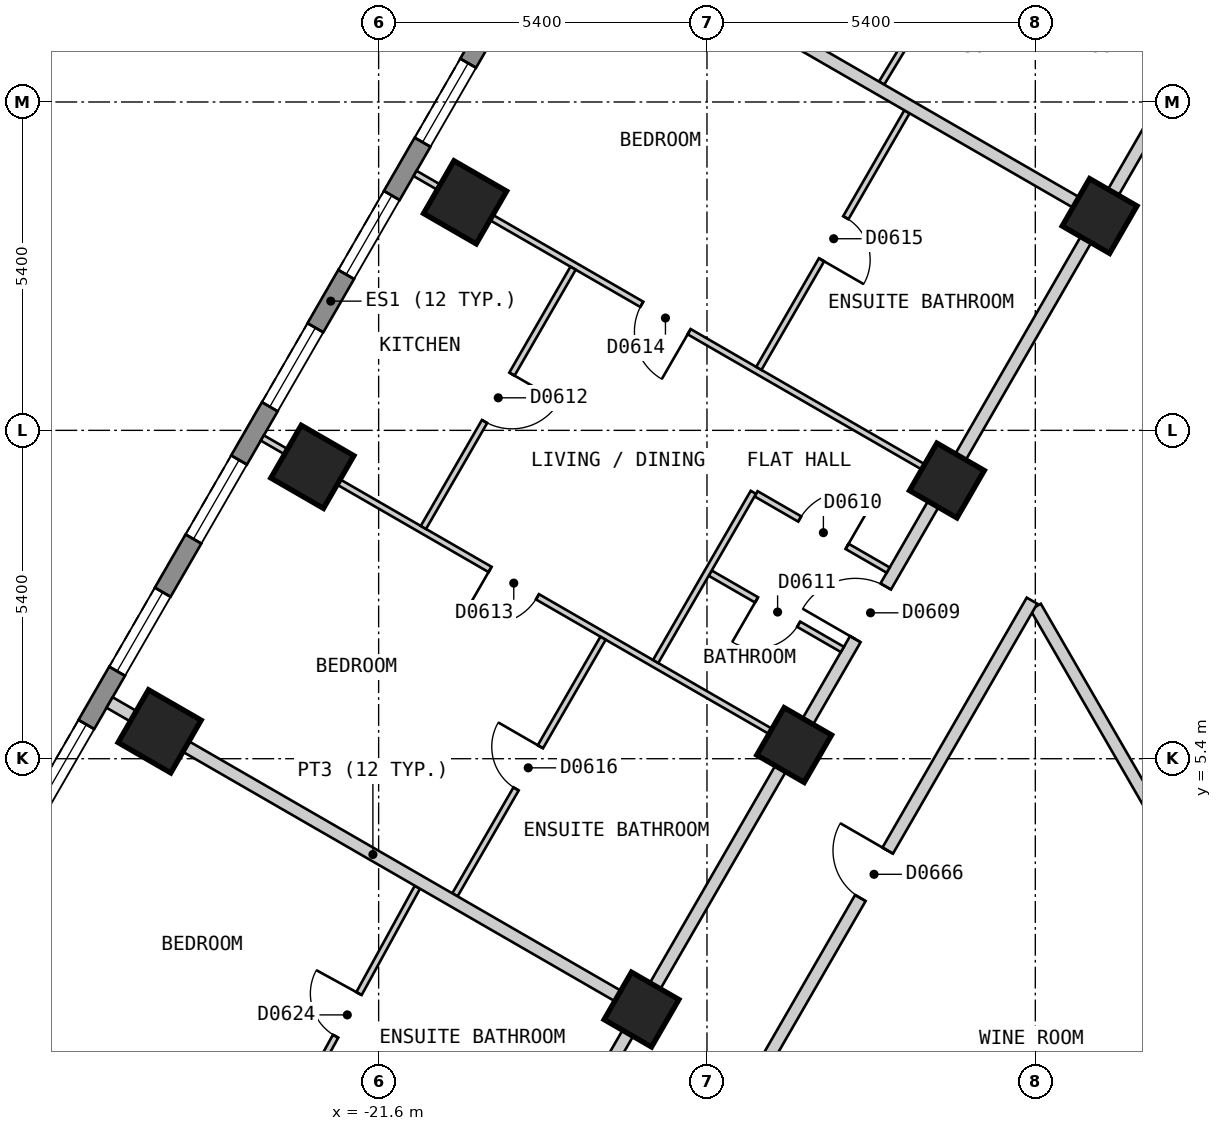
"""IFC4 building model, lengths in metres.
Left out: names, types, materials, properties, quantities, classifications, styles, units other than length and angle.
Written with IfcOpenShell. Run it as: python <this file> out.ifc"""

import sys

from ifc_helpers import new_model, si_unit, direction, frame, frame_2d, origin, origin_2d, place, context, subcontext, project, spatial, polyline, rectangle, outline, extrude, element, fill, save


model = new_model("IFC4")
c1 = context("Model", 3, precision=1e-05, world=origin(), true_north=direction((0.0, 1.0)))
c2 = subcontext(c1, "Body", "Model", "MODEL_VIEW")
j1 = project(units=[si_unit("LENGTHUNIT", "METRE"), si_unit("PLANEANGLEUNIT", "RADIAN")], contexts=[c1])
p1 = place(None, origin())
s1 = spatial("IfcSite", under=j1, at=p1, CompositionType="ELEMENT")
p2 = place(p1, origin())
s2 = spatial("IfcBuilding", under=s1, at=p2, CompositionType="ELEMENT")
p3 = place(p2, frame((0.0, 0.0, 75.0)))
s3 = spatial("IfcBuildingStorey", under=s2, at=p3, CompositionType="ELEMENT", Elevation=75.0)
for number, where, z_axis, x_axis in (
    (1, (-20.178, 14.55, 0.0), (0.0, 0.0, 1.0), (-0.5, -0.866, 0.0)),
    (2, (-22.69, 10.2, 0.0), (0.0, 0.0, 1.0), (-0.5, -0.866, 0.0)),
    (3, (-25.202, 5.85, 0.0), (0.0, 0.0, 1.0), (-0.5, -0.866, 0.0)),
):
    element("IfcColumn", number, at=place(p3, frame(where, z_axis=z_axis, x_axis=x_axis)), inside=s3, PredefinedType="COLUMN", context=c2, shape_type="SweptSolid", body=[
        extrude(rectangle(XDim=1.0, YDim=1.0, at=origin_2d()), origin(), (0.0, 0.0, 1.0), 3.0),
    ])
for number, where, z_axis, x_axis in (
    (4, (-9.743, 14.325, 0.0), (0.0, 0.0, 1.0), (-0.5, -0.866, 0.0)),
    (5, (-12.254, 9.975, 0.0), (0.0, 0.0, 1.0), (-0.5, -0.866, 0.0)),
    (6, (-14.766, 5.625, 0.0), (0.0, 0.0, 1.0), (-0.5, -0.866, 0.0)),
    (7, (-17.277, 1.275, 0.0), (0.0, 0.0, 1.0), (-0.5, -0.866, 0.0)),
):
    element("IfcColumn", number, at=place(p3, frame(where, z_axis=z_axis, x_axis=x_axis)), inside=s3, PredefinedType="COLUMN", context=c2, shape_type="SweptSolid", body=[
        extrude(rectangle(XDim=0.9, YDim=0.9, at=origin_2d()), origin(), (0.0, 0.0, 1.0), 3.0),
    ])
p4 = place(p3, frame((-15.747, 24.425, 0.0), z_axis=(0.0, 0.0, 1.0), x_axis=(-0.500027479704, -0.866009537788, 0.0)))
e8 = element("IfcWall", 8, at=p4, inside=s3, PredefinedType="SOLIDWALL", context=c2, shape_type="SweptSolid", body=[
    extrude(outline(polyline([(0.0, -0.15), (26.559, -0.15), (26.478, 0.15), (0.08, 0.15), (0.0, -0.15)])), origin(), (0.0, 0.0, 1.0), 2.7),
])
p5 = place(p4, frame((1.227, 0.0, 0.15)))
e9 = element("IfcOpeningElement", 9, at=p5, cuts=e8, PredefinedType="OPENING", context=c2, shape_type="SweptSolid", body=[
    extrude(rectangle(XDim=1.5, YDim=2.1, at=frame_2d((0.75, 1.05))), frame((0.0, 0.16, 0.0), z_axis=(0.0, -1.0, 0.0), x_axis=(1.0, 0.0, 0.0)), (0.0, 0.0, 1.0), 0.32),
])
p6 = place(p4, frame((3.739, 0.0, 0.15)))
e10 = element("IfcOpeningElement", 10, at=p6, cuts=e8, PredefinedType="OPENING", context=c2, shape_type="SweptSolid", body=[
    extrude(rectangle(XDim=1.5, YDim=2.1, at=frame_2d((0.75, 1.05))), frame((0.0, 0.16, 0.0), z_axis=(0.0, -1.0, 0.0), x_axis=(1.0, 0.0, 0.0)), (0.0, 0.0, 1.0), 0.32),
])
p7 = place(p4, frame((6.25, 0.0, 0.15)))
e11 = element("IfcOpeningElement", 11, at=p7, cuts=e8, PredefinedType="OPENING", context=c2, shape_type="SweptSolid", body=[
    extrude(rectangle(XDim=1.5, YDim=2.1, at=frame_2d((0.75, 1.05))), frame((0.0, 0.16, 0.0), z_axis=(0.0, -1.0, 0.0), x_axis=(1.0, 0.0, 0.0)), (0.0, 0.0, 1.0), 0.32),
])
p8 = place(p4, frame((8.761, 0.0, 0.15)))
e12 = element("IfcOpeningElement", 12, at=p8, cuts=e8, PredefinedType="OPENING", context=c2, shape_type="SweptSolid", body=[
    extrude(rectangle(XDim=1.5, YDim=2.1, at=frame_2d((0.75, 1.05))), frame((0.0, 0.16, 0.0), z_axis=(0.0, -1.0, 0.0), x_axis=(1.0, 0.0, 0.0)), (0.0, 0.0, 1.0), 0.32),
])
p9 = place(p4, frame((11.273, 0.0, 0.15)))
e13 = element("IfcOpeningElement", 13, at=p9, cuts=e8, PredefinedType="OPENING", context=c2, shape_type="SweptSolid", body=[
    extrude(rectangle(XDim=1.5, YDim=2.1, at=frame_2d((0.75, 1.05))), frame((0.0, 0.16, 0.0), z_axis=(0.0, -1.0, 0.0), x_axis=(1.0, 0.0, 0.0)), (0.0, 0.0, 1.0), 0.32),
])
p10 = place(p4, frame((13.785, 0.0, 0.15)))
e14 = element("IfcOpeningElement", 14, at=p10, cuts=e8, PredefinedType="OPENING", context=c2, shape_type="SweptSolid", body=[
    extrude(rectangle(XDim=1.5, YDim=2.1, at=frame_2d((0.75, 1.05))), frame((0.0, 0.16, 0.0), z_axis=(0.0, -1.0, 0.0), x_axis=(1.0, 0.0, 0.0)), (0.0, 0.0, 1.0), 0.32),
])
p11 = place(p4, frame((16.296, 0.0, 0.15)))
e15 = element("IfcOpeningElement", 15, at=p11, cuts=e8, PredefinedType="OPENING", context=c2, shape_type="SweptSolid", body=[
    extrude(rectangle(XDim=1.5, YDim=2.1, at=frame_2d((0.75, 1.05))), frame((0.0, 0.16, 0.0), z_axis=(0.0, -1.0, 0.0), x_axis=(1.0, 0.0, 0.0)), (0.0, 0.0, 1.0), 0.32),
])
p12 = place(p4, frame((18.807, 0.0, 0.15)))
e16 = element("IfcOpeningElement", 16, at=p12, cuts=e8, PredefinedType="OPENING", context=c2, shape_type="SweptSolid", body=[
    extrude(rectangle(XDim=1.5, YDim=2.1, at=frame_2d((0.75, 1.05))), frame((0.0, 0.16, 0.0), z_axis=(0.0, -1.0, 0.0), x_axis=(1.0, 0.0, 0.0)), (0.0, 0.0, 1.0), 0.32),
])
p13 = place(p4, frame((21.319, 0.0, 0.15)))
e17 = element("IfcOpeningElement", 17, at=p13, cuts=e8, PredefinedType="OPENING", context=c2, shape_type="SweptSolid", body=[
    extrude(rectangle(XDim=1.5, YDim=2.1, at=frame_2d((0.75, 1.05))), frame((0.0, 0.16, 0.0), z_axis=(0.0, -1.0, 0.0), x_axis=(1.0, 0.0, 0.0)), (0.0, 0.0, 1.0), 0.32),
])
p14 = place(p4, frame((23.831, 0.0, 0.15)))
e18 = element("IfcOpeningElement", 18, at=p14, cuts=e8, PredefinedType="OPENING", context=c2, shape_type="SweptSolid", body=[
    extrude(rectangle(XDim=1.5, YDim=2.1, at=frame_2d((0.75, 1.05))), frame((0.0, 0.16, 0.0), z_axis=(0.0, -1.0, 0.0), x_axis=(1.0, 0.0, 0.0)), (0.0, 0.0, 1.0), 0.32),
])
p15 = place(p3, frame((-10.796, 7.899, 0.0), z_axis=(0.0, 0.0, 1.0), x_axis=(0.500010383074, -0.866019409031, 0.0)))
e19 = element("IfcWall", 19, at=p15, inside=s3, PredefinedType="PARTITIONING", context=c2, shape_type="SweptSolid", body=[
    extrude(rectangle(XDim=7.535, YDim=0.2, at=frame_2d((3.768, 0.0))), origin(), (0.0, 0.0, 1.0), 2.7),
])
p16 = place(p3, frame((-16.05, -1.0, 0.0), z_axis=(0.0, 0.0, 1.0), x_axis=(0.499962449088, 0.866047082728, 0.0)))
e20 = element("IfcWall", 20, at=p16, inside=s3, PredefinedType="PARTITIONING", context=c2, shape_type="SweptSolid", body=[
    extrude(rectangle(XDim=10.391, YDim=0.2, at=frame_2d((5.195, 0.0))), origin(), (0.0, 0.0, 1.0), 2.7),
])
p17 = place(p16, frame((4.745, 0.0, 0.0)))
e21 = element("IfcOpeningElement", 21, at=p17, cuts=e20, PredefinedType="OPENING", context=c2, shape_type="SweptSolid", body=[
    extrude(rectangle(XDim=0.9, YDim=2.1, at=frame_2d((0.45, 1.05))), frame((0.0, 0.11, 0.0), z_axis=(0.0, -1.0, 0.0), x_axis=(1.0, 0.0, 0.0)), (0.0, 0.0, 1.0), 0.22),
])
p18 = place(p3, frame((-18.562, -0.951, 0.0), z_axis=(0.0, 0.0, 1.0), x_axis=(0.499992962407, 0.866029466902, 0.0)))
e22 = element("IfcWall", 22, at=p18, inside=s3, PredefinedType="PARTITIONING", context=c2, shape_type="SweptSolid", body=[
    extrude(rectangle(XDim=20.208, YDim=0.2, at=frame_2d((10.104, 0.0))), origin(), (0.0, 0.0, 1.0), 2.7),
])
p19 = place(p18, frame((9.604, 0.0, 0.0)))
e23 = element("IfcOpeningElement", 23, at=p19, cuts=e22, PredefinedType="OPENING", context=c2, shape_type="SweptSolid", body=[
    extrude(rectangle(XDim=1.0, YDim=2.1, at=frame_2d((0.5, 1.05))), frame((0.0, 0.11, 0.0), z_axis=(0.0, -1.0, 0.0), x_axis=(1.0, 0.0, 0.0)), (0.0, 0.0, 1.0), 0.22),
])
p20 = place(p3, frame((-10.742, 20.606, 0.0), z_axis=(0.0, 0.0, 1.0), x_axis=(0.50003312339, -0.866006279142, 0.0)))
e24 = element("IfcWall", 24, at=p20, inside=s3, PredefinedType="PARTITIONING", context=c2, shape_type="SweptSolid", body=[
    extrude(rectangle(XDim=4.626, YDim=0.1, at=frame_2d((2.313, 0.0))), origin(), (0.0, 0.0, 1.0), 2.7),
])
p21 = place(p3, frame((-16.147, 8.452, 0.0), z_axis=(0.0, 0.0, 1.0), x_axis=(0.866080321209, -0.499904868165, 0.0)))
e25 = element("IfcWall", 25, at=p21, inside=s3, PredefinedType="PARTITIONING", context=c2, shape_type="SweptSolid", body=[
    extrude(rectangle(XDim=2.51, YDim=0.1, at=frame_2d((1.255, 0.0))), origin(), (0.0, 0.0, 1.0), 2.7),
])
p22 = place(p21, frame((0.88, 0.0, 0.0)))
e26 = element("IfcOpeningElement", 26, at=p22, cuts=e25, PredefinedType="OPENING", context=c2, shape_type="SweptSolid", body=[
    extrude(rectangle(XDim=0.8, YDim=2.1, at=frame_2d((0.4, 1.05))), frame((0.0, 0.06, 0.0), z_axis=(0.0, -1.0, 0.0), x_axis=(1.0, 0.0, 0.0)), (0.0, 0.0, 1.0), 0.12),
])
p23 = place(p3, frame((-23.513, 10.675, 0.0), z_axis=(0.0, 0.0, 1.0), x_axis=(0.866041268327, -0.499972520799, 0.0)))
e27 = element("IfcWall", 27, at=p23, inside=s3, PredefinedType="PARTITIONING", context=c2, shape_type="SweptSolid", body=[
    extrude(rectangle(XDim=10.0, YDim=0.1, at=frame_2d((5.0, 0.0))), origin(), (0.0, 0.0, 1.0), 2.7),
])
p24 = place(p23, frame((4.325, 0.0, 0.0)))
e28 = element("IfcOpeningElement", 28, at=p24, cuts=e27, PredefinedType="OPENING", context=c2, shape_type="SweptSolid", body=[
    extrude(rectangle(XDim=0.9, YDim=2.1, at=frame_2d((0.45, 1.05))), frame((0.0, 0.06, 0.0), z_axis=(0.0, -1.0, 0.0), x_axis=(1.0, 0.0, 0.0)), (0.0, 0.0, 1.0), 0.12),
])
p25 = place(p3, frame((-15.393, 9.757, 0.0), z_axis=(0.0, 0.0, 1.0), x_axis=(0.865940918122, -0.500146304917, 0.0)))
e29 = element("IfcWall", 29, at=p25, inside=s3, PredefinedType="PARTITIONING", context=c2, shape_type="SweptSolid", body=[
    extrude(rectangle(XDim=2.51, YDim=0.1, at=frame_2d((1.255, 0.0))), origin(), (0.0, 0.0, 1.0), 2.7),
])
p26 = place(p25, frame((0.829, 0.0, 0.0)))
e30 = element("IfcOpeningElement", 30, at=p26, cuts=e29, PredefinedType="OPENING", context=c2, shape_type="SweptSolid", body=[
    extrude(rectangle(XDim=0.9, YDim=2.1, at=frame_2d((0.45, 1.05))), frame((0.0, 0.06, 0.0), z_axis=(0.0, -1.0, 0.0), x_axis=(1.0, 0.0, 0.0)), (0.0, 0.0, 1.0), 0.12),
])
p27 = place(p3, frame((-21.001, 15.025, 0.0), z_axis=(0.0, 0.0, 1.0), x_axis=(0.866016855193, -0.500014806302, 0.0)))
e31 = element("IfcWall", 31, at=p27, inside=s3, PredefinedType="PARTITIONING", context=c2, shape_type="SweptSolid", body=[
    extrude(rectangle(XDim=10.0, YDim=0.1, at=frame_2d((5.0, 0.0))), origin(), (0.0, 0.0, 1.0), 2.7),
])
p28 = place(p27, frame((4.305, 0.0, 0.0)))
e32 = element("IfcOpeningElement", 32, at=p28, cuts=e31, PredefinedType="OPENING", context=c2, shape_type="SweptSolid", body=[
    extrude(rectangle(XDim=0.9, YDim=2.1, at=frame_2d((0.45, 1.05))), frame((0.0, 0.06, 0.0), z_axis=(0.0, -1.0, 0.0), x_axis=(1.0, 0.0, 0.0)), (0.0, 0.0, 1.0), 0.12),
])
p29 = place(p3, frame((-13.328, 16.511, 0.0), z_axis=(0.0, 0.0, 1.0), x_axis=(0.518570528669, 0.855034857065, 0.0)))
e33 = element("IfcWall", 33, at=p29, inside=s3, PredefinedType="PARTITIONING", context=c2, shape_type="SweptSolid", body=[
    extrude(rectangle(XDim=4.83, YDim=0.1, at=frame_2d((2.415, 0.0))), origin(), (0.0, 0.0, 1.0), 2.7),
])
p30 = place(p29, frame((1.995, 0.0, 0.0)))
e34 = element("IfcOpeningElement", 34, at=p30, cuts=e33, PredefinedType="OPENING", context=c2, shape_type="SweptSolid", body=[
    extrude(rectangle(XDim=0.8, YDim=2.1, at=frame_2d((0.4, 1.05))), frame((0.0, 0.06, 0.0), z_axis=(0.0, -1.0, 0.0), x_axis=(1.0, 0.0, 0.0)), (0.0, 0.0, 1.0), 0.12),
])
p31 = place(p3, frame((-17.044, 6.999, 0.0), z_axis=(0.0, 0.0, 1.0), x_axis=(0.500176309913, 0.865923587277, 0.0)))
e35 = element("IfcWall", 35, at=p31, inside=s3, PredefinedType="PARTITIONING", context=c2, shape_type="SweptSolid", body=[
    extrude(rectangle(XDim=3.213, YDim=0.1, at=frame_2d((1.606, 0.0))), origin(), (0.0, 0.0, 1.0), 2.7),
])
p32 = place(p3, frame((-20.345, 3.162, 0.0), z_axis=(0.0, 0.0, 1.0), x_axis=(0.499943653708, 0.866057932887, 0.0)))
e36 = element("IfcWall", 36, at=p32, inside=s3, PredefinedType="PARTITIONING", context=c2, shape_type="SweptSolid", body=[
    extrude(rectangle(XDim=4.873, YDim=0.1, at=frame_2d((2.436, 0.0))), origin(), (0.0, 0.0, 1.0), 2.7),
])
p33 = place(p32, frame((2.011, 0.0, 0.0)))
e37 = element("IfcOpeningElement", 37, at=p33, cuts=e36, PredefinedType="OPENING", context=c2, shape_type="SweptSolid", body=[
    extrude(rectangle(XDim=0.8, YDim=2.1, at=frame_2d((0.4, 1.05))), frame((0.0, 0.06, 0.0), z_axis=(0.0, -1.0, 0.0), x_axis=(1.0, 0.0, 0.0)), (0.0, 0.0, 1.0), 0.12),
])
p34 = place(p3, frame((-15.347, 11.819, 0.0), z_axis=(0.0, 0.0, 1.0), x_axis=(0.499943653708, 0.866057932887, 0.0)))
e38 = element("IfcWall", 38, at=p34, inside=s3, PredefinedType="PARTITIONING", context=c2, shape_type="SweptSolid", body=[
    extrude(rectangle(XDim=4.873, YDim=0.1, at=frame_2d((2.436, 0.0))), origin(), (0.0, 0.0, 1.0), 2.7),
])
p35 = place(p34, frame((2.062, 0.0, 0.0)))
e39 = element("IfcOpeningElement", 39, at=p35, cuts=e38, PredefinedType="OPENING", context=c2, shape_type="SweptSolid", body=[
    extrude(rectangle(XDim=0.8, YDim=2.1, at=frame_2d((0.4, 1.05))), frame((0.0, 0.06, 0.0), z_axis=(0.0, -1.0, 0.0), x_axis=(1.0, 0.0, 0.0)), (0.0, 0.0, 1.0), 0.12),
])
p36 = place(p3, frame((-20.864, 9.203, 0.0), z_axis=(0.0, 0.0, 1.0), x_axis=(0.500000007376, 0.866025399526, 0.0)))
e40 = element("IfcWall", 40, at=p36, inside=s3, PredefinedType="PARTITIONING", context=c2, shape_type="SweptSolid", body=[
    extrude(rectangle(XDim=4.924, YDim=0.1, at=frame_2d((2.462, 0.0))), origin(), (0.0, 0.0, 1.0), 2.7),
])
p37 = place(p36, frame((2.012, 0.0, 0.0)))
e41 = element("IfcOpeningElement", 41, at=p37, cuts=e40, PredefinedType="OPENING", context=c2, shape_type="SweptSolid", body=[
    extrude(rectangle(XDim=0.9, YDim=2.1, at=frame_2d((0.45, 1.05))), frame((0.0, 0.06, 0.0), z_axis=(0.0, -1.0, 0.0), x_axis=(1.0, 0.0, 0.0)), (0.0, 0.0, 1.0), 0.12),
])
p38 = place(p3, frame((-23.289, -0.951, 0.0), z_axis=(0.0, 0.0, 1.0), x_axis=(0.481164463081, 0.876630343684, 0.0)))
e42 = element("IfcWall", 42, at=p38, inside=s3, PredefinedType="PARTITIONING", context=c2, shape_type="SweptSolid", body=[
    extrude(rectangle(XDim=4.834, YDim=0.1, at=frame_2d((2.417, 0.0))), origin(), (0.0, 0.0, 1.0), 2.7),
])
p39 = place(p38, frame((2.039, 0.0, 0.0)))
e43 = element("IfcOpeningElement", 43, at=p39, cuts=e42, PredefinedType="OPENING", context=c2, shape_type="SweptSolid", body=[
    extrude(rectangle(XDim=0.8, YDim=2.1, at=frame_2d((0.4, 1.05))), frame((0.0, 0.06, 0.0), z_axis=(0.0, -1.0, 0.0), x_axis=(1.0, 0.0, 0.0)), (0.0, 0.0, 1.0), 0.12),
])
p40 = place(p3, frame((-26.025, 6.325, 0.0), z_axis=(0.0, 0.0, 1.0), x_axis=(0.866041268327, -0.499972520799, 0.0)))
e44 = element("IfcWall", 44, at=p40, inside=s3, PredefinedType="PARTITIONING", context=c2, shape_type="SweptSolid", body=[
    extrude(rectangle(XDim=10.0, YDim=0.2, at=frame_2d((5.0, 0.0))), origin(), (0.0, 0.0, 1.0), 2.7),
])
p41 = place(p3, frame((-18.489, 19.375, 0.0), z_axis=(0.0, 0.0, 1.0), x_axis=(0.866016855193, -0.500014806302, 0.0)))
e45 = element("IfcWall", 45, at=p41, inside=s3, PredefinedType="PARTITIONING", context=c2, shape_type="SweptSolid", body=[
    extrude(rectangle(XDim=10.0, YDim=0.2, at=frame_2d((5.0, 0.0))), origin(), (0.0, 0.0, 1.0), 2.7),
])
p42 = place(p8, origin())
e46 = element("IfcWindow", 46, at=p42, inside=s3, PartitioningType="SINGLE_PANEL", PredefinedType="WINDOW", context=c2, shape_type="SweptSolid", body=[
    extrude(rectangle(XDim=1.5, YDim=2.1, at=frame_2d((0.75, 1.05))), frame((0.0, 0.03, 0.0), z_axis=(0.0, -1.0, 0.0), x_axis=(1.0, 0.0, 0.0)), (0.0, 0.0, 1.0), 0.06),
])
fill(e12, e46)
p43 = place(p9, origin())
e47 = element("IfcWindow", 47, at=p43, inside=s3, PartitioningType="SINGLE_PANEL", PredefinedType="WINDOW", context=c2, shape_type="SweptSolid", body=[
    extrude(rectangle(XDim=1.5, YDim=2.1, at=frame_2d((0.75, 1.05))), frame((0.0, 0.03, 0.0), z_axis=(0.0, -1.0, 0.0), x_axis=(1.0, 0.0, 0.0)), (0.0, 0.0, 1.0), 0.06),
])
fill(e13, e47)
p44 = place(p10, origin())
e48 = element("IfcWindow", 48, at=p44, inside=s3, PartitioningType="SINGLE_PANEL", PredefinedType="WINDOW", context=c2, shape_type="SweptSolid", body=[
    extrude(rectangle(XDim=1.5, YDim=2.1, at=frame_2d((0.75, 1.05))), frame((0.0, 0.03, 0.0), z_axis=(0.0, -1.0, 0.0), x_axis=(1.0, 0.0, 0.0)), (0.0, 0.0, 1.0), 0.06),
])
fill(e14, e48)
p45 = place(p11, origin())
e49 = element("IfcWindow", 49, at=p45, inside=s3, PartitioningType="SINGLE_PANEL", PredefinedType="WINDOW", context=c2, shape_type="SweptSolid", body=[
    extrude(rectangle(XDim=1.5, YDim=2.1, at=frame_2d((0.75, 1.05))), frame((0.0, 0.03, 0.0), z_axis=(0.0, -1.0, 0.0), x_axis=(1.0, 0.0, 0.0)), (0.0, 0.0, 1.0), 0.06),
])
fill(e15, e49)
p46 = place(p12, origin())
e50 = element("IfcWindow", 50, at=p46, inside=s3, PartitioningType="SINGLE_PANEL", PredefinedType="WINDOW", context=c2, shape_type="SweptSolid", body=[
    extrude(rectangle(XDim=1.5, YDim=2.1, at=frame_2d((0.75, 1.05))), frame((0.0, 0.03, 0.0), z_axis=(0.0, -1.0, 0.0), x_axis=(1.0, 0.0, 0.0)), (0.0, 0.0, 1.0), 0.06),
])
fill(e16, e50)
p47 = place(p13, origin())
e51 = element("IfcWindow", 51, at=p47, inside=s3, PartitioningType="SINGLE_PANEL", PredefinedType="WINDOW", context=c2, shape_type="SweptSolid", body=[
    extrude(rectangle(XDim=1.5, YDim=2.1, at=frame_2d((0.75, 1.05))), frame((0.0, 0.03, 0.0), z_axis=(0.0, -1.0, 0.0), x_axis=(1.0, 0.0, 0.0)), (0.0, 0.0, 1.0), 0.06),
])
fill(e17, e51)
p48 = place(p19, origin())
e52 = element("IfcDoor", 52, at=p48, inside=s3, OperationType="SINGLE_SWING_LEFT", PredefinedType="DOOR", context=c2, shape_type="SweptSolid", body=[
    extrude(rectangle(XDim=1.0, YDim=2.1, at=frame_2d((0.5, 1.05))), frame((0.0, 0.025, 0.0), z_axis=(0.0, -1.0, 0.0), x_axis=(1.0, 0.0, 0.0)), (0.0, 0.0, 1.0), 0.05),
])
fill(e23, e52)
p49 = place(p26, origin())
e53 = element("IfcDoor", 53, at=p49, inside=s3, OperationType="SINGLE_SWING_RIGHT", PredefinedType="DOOR", context=c2, shape_type="SweptSolid", body=[
    extrude(rectangle(XDim=0.9, YDim=2.1, at=frame_2d((0.45, 1.05))), frame((0.0, 0.025, 0.0), z_axis=(0.0, -1.0, 0.0), x_axis=(1.0, 0.0, 0.0)), (0.0, 0.0, 1.0), 0.05),
])
fill(e30, e53)
p50 = place(p22, origin())
e54 = element("IfcDoor", 54, at=p50, inside=s3, OperationType="SINGLE_SWING_LEFT", PredefinedType="DOOR", context=c2, shape_type="SweptSolid", body=[
    extrude(rectangle(XDim=0.8, YDim=2.1, at=frame_2d((0.4, 1.05))), frame((0.0, 0.025, 0.0), z_axis=(0.0, -1.0, 0.0), x_axis=(1.0, 0.0, 0.0)), (0.0, 0.0, 1.0), 0.05),
])
fill(e26, e54)
p51 = place(p37, origin())
e55 = element("IfcDoor", 55, at=p51, inside=s3, OperationType="SINGLE_SWING_RIGHT", PredefinedType="DOOR", context=c2, shape_type="SweptSolid", body=[
    extrude(rectangle(XDim=0.9, YDim=2.1, at=frame_2d((0.45, 1.05))), frame((0.0, 0.025, 0.0), z_axis=(0.0, -1.0, 0.0), x_axis=(1.0, 0.0, 0.0)), (0.0, 0.0, 1.0), 0.05),
])
fill(e41, e55)
p52 = place(p24, origin())
e56 = element("IfcDoor", 56, at=p52, inside=s3, OperationType="SINGLE_SWING_LEFT", PredefinedType="DOOR", context=c2, shape_type="SweptSolid", body=[
    extrude(rectangle(XDim=0.9, YDim=2.1, at=frame_2d((0.45, 1.05))), frame((0.0, 0.025, 0.0), z_axis=(0.0, -1.0, 0.0), x_axis=(1.0, 0.0, 0.0)), (0.0, 0.0, 1.0), 0.05),
])
fill(e28, e56)
p53 = place(p28, origin())
e57 = element("IfcDoor", 57, at=p53, inside=s3, OperationType="SINGLE_SWING_RIGHT", PredefinedType="DOOR", context=c2, shape_type="SweptSolid", body=[
    extrude(rectangle(XDim=0.9, YDim=2.1, at=frame_2d((0.45, 1.05))), frame((0.0, 0.025, 0.0), z_axis=(0.0, -1.0, 0.0), x_axis=(1.0, 0.0, 0.0)), (0.0, 0.0, 1.0), 0.05),
])
fill(e32, e57)
p54 = place(p35, origin())
e58 = element("IfcDoor", 58, at=p54, inside=s3, OperationType="SINGLE_SWING_LEFT", PredefinedType="DOOR", context=c2, shape_type="SweptSolid", body=[
    extrude(rectangle(XDim=0.8, YDim=2.1, at=frame_2d((0.4, 1.05))), frame((0.0, 0.025, 0.0), z_axis=(0.0, -1.0, 0.0), x_axis=(1.0, 0.0, 0.0)), (0.0, 0.0, 1.0), 0.05),
])
fill(e39, e58)
p55 = place(p33, origin())
e59 = element("IfcDoor", 59, at=p55, inside=s3, OperationType="SINGLE_SWING_RIGHT", PredefinedType="DOOR", context=c2, shape_type="SweptSolid", body=[
    extrude(rectangle(XDim=0.8, YDim=2.1, at=frame_2d((0.4, 1.05))), frame((0.0, 0.025, 0.0), z_axis=(0.0, -1.0, 0.0), x_axis=(1.0, 0.0, 0.0)), (0.0, 0.0, 1.0), 0.05),
])
fill(e37, e59)
p56 = place(p39, origin())
e60 = element("IfcDoor", 60, at=p56, inside=s3, OperationType="SINGLE_SWING_RIGHT", PredefinedType="DOOR", context=c2, shape_type="SweptSolid", body=[
    extrude(rectangle(XDim=0.8, YDim=2.1, at=frame_2d((0.4, 1.05))), frame((0.0, 0.025, 0.0), z_axis=(0.0, -1.0, 0.0), x_axis=(1.0, 0.0, 0.0)), (0.0, 0.0, 1.0), 0.05),
])
fill(e43, e60)
p57 = place(p17, origin())
e61 = element("IfcDoor", 61, at=p57, inside=s3, OperationType="SINGLE_SWING_RIGHT", PredefinedType="DOOR", context=c2, shape_type="SweptSolid", body=[
    extrude(rectangle(XDim=0.9, YDim=2.1, at=frame_2d((0.45, 1.05))), frame((0.0, 0.025, 0.0), z_axis=(0.0, -1.0, 0.0), x_axis=(1.0, 0.0, 0.0)), (0.0, 0.0, 1.0), 0.05),
])
fill(e21, e61)
save(model, sys.argv[1])
